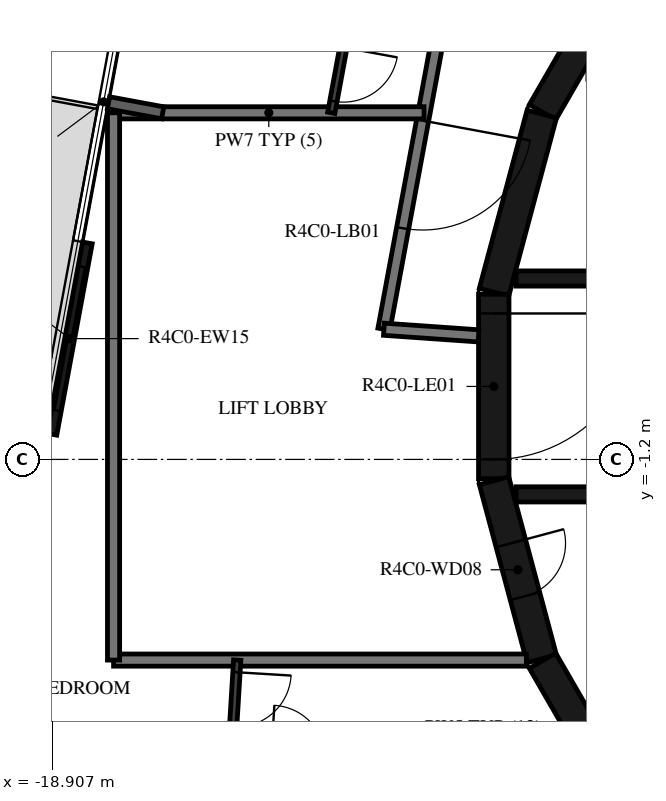
"""IFC4 building model, lengths in metres.
Left out: names, types, materials, properties, quantities, classifications, styles, units other than length and angle.
Written with IfcOpenShell. Run it as: python <this file> out.ifc"""

import sys

from ifc_helpers import new_model, si_unit, direction, frame, frame_2d, origin, place, context, subcontext, project, spatial, rectangle, extrude, element, fill, save


model = new_model("IFC4")
c1 = context("Model", 3, precision=1e-05, world=origin(), true_north=direction((0.0, 1.0)))
c2 = subcontext(c1, "Body", "Model", "MODEL_VIEW")
j1 = project(units=[si_unit("LENGTHUNIT", "METRE"), si_unit("PLANEANGLEUNIT", "RADIAN")], contexts=[c1])
p1 = place(None, origin())
s1 = spatial("IfcSite", under=j1, at=p1, CompositionType="ELEMENT")
p2 = place(p1, origin())
s2 = spatial("IfcBuilding", under=s1, at=p2, CompositionType="ELEMENT")
p3 = place(p2, frame((0.0, 0.0, 179.7)))
s3 = spatial("IfcBuildingStorey", under=s2, at=p3, CompositionType="ELEMENT", Elevation=179.7)
p4 = place(p3, frame((-18.33, 2.36, 0.0), z_axis=(0.0, 0.0, 1.0), x_axis=(-0.18226136951, -0.983250117307, 0.0)))
e1 = element("IfcWall", 1, at=p4, inside=s3, PredefinedType="STANDARD", context=c2, shape_type="SweptSolid", body=[
    extrude(rectangle(XDim=3.2, YDim=0.16, at=frame_2d((1.6, 0.0))), origin(), (0.0, 0.0, 1.0), 3.05),
])
p5 = place(p4, frame((0.4, 0.0, 0.0)))
e2 = element("IfcOpeningElement", 2, at=p5, cuts=e1, PredefinedType="OPENING", context=c2, shape_type="SweptSolid", body=[
    extrude(rectangle(XDim=2.4, YDim=2.4, at=frame_2d((1.2, 1.2))), frame((0.0, 0.09, 0.0), z_axis=(0.0, -1.0, 0.0), x_axis=(1.0, 0.0, 0.0)), (0.0, 0.0, 1.0), 0.18),
])
for number, where, z_axis, x_axis in (
    (3, (-9.329, 7.137, 0.0), (0.0, 0.0, 1.0), (-0.5, -0.866, 0.0)),
    (4, (-10.858, 4.479, 0.0), (0.0, 0.0, 1.0), (-0.259, -0.966, 0.0)),
):
    element("IfcWall", number, at=place(p3, frame(where, z_axis=z_axis, x_axis=x_axis)), inside=s3, PredefinedType="SHEAR", context=c2, shape_type="SweptSolid", body=[
        extrude(rectangle(XDim=3.033, YDim=0.5, at=frame_2d((1.516, 0.0))), origin(), (0.0, 0.0, 1.0), 3.05),
    ])
p6 = place(p3, frame((-11.647, 1.516, 0.0), z_axis=(0.0, 0.0, 1.0), x_axis=(0.0, -1.0, 0.0)))
e5 = element("IfcWall", 5, at=p6, inside=s3, PredefinedType="SHEAR", context=c2, shape_type="SweptSolid", body=[
    extrude(rectangle(XDim=3.033, YDim=0.5, at=frame_2d((1.516, 0.0))), origin(), (0.0, 0.0, 1.0), 3.05),
])
p7 = place(p6, frame((0.316, 0.0, 0.0)))
e6 = element("IfcOpeningElement", 6, at=p7, cuts=e5, PredefinedType="OPENING", context=c2, shape_type="SweptSolid", body=[
    extrude(rectangle(XDim=2.4, YDim=2.1, at=frame_2d((1.2, 1.05))), frame((0.0, 0.26, 0.0), z_axis=(0.0, -1.0, 0.0), x_axis=(1.0, 0.0, 0.0)), (0.0, 0.0, 1.0), 0.52),
])
p8 = place(p3, frame((-11.643, -1.55, 0.0), z_axis=(0.0, 0.0, 1.0), x_axis=(0.258734743916, -0.965948410781, 0.0)))
e7 = element("IfcWall", 7, at=p8, inside=s3, PredefinedType="SHEAR", context=c2, shape_type="SweptSolid", body=[
    extrude(rectangle(XDim=3.033, YDim=0.5, at=frame_2d((1.516, 0.0))), origin(), (0.0, 0.0, 1.0), 3.05),
])
p9 = place(p8, frame((1.066, 0.0, 0.0)))
e8 = element("IfcOpeningElement", 8, at=p9, cuts=e7, PredefinedType="OPENING", context=c2, shape_type="SweptSolid", body=[
    extrude(rectangle(XDim=0.9, YDim=2.1, at=frame_2d((0.45, 1.05))), frame((0.0, 0.26, 0.0), z_axis=(0.0, -1.0, 0.0), x_axis=(1.0, 0.0, 0.0)), (0.0, 0.0, 1.0), 0.52),
])
p10 = place(p3, frame((-10.845, -4.51, 0.0), z_axis=(0.0, 0.0, 1.0), x_axis=(0.500087131594, -0.865975092491, 0.0)))
e9 = element("IfcWall", 9, at=p10, inside=s3, PredefinedType="SHEAR", context=c2, shape_type="SweptSolid", body=[
    extrude(rectangle(XDim=3.033, YDim=0.5, at=frame_2d((1.516, 0.0))), origin(), (0.0, 0.0, 1.0), 3.05),
])
p11 = place(p3, frame((-11.28, 1.775, 0.0), z_axis=(0.0, 0.0, 1.0), x_axis=(1.0, 0.0, 0.0)))
e10 = element("IfcWall", 10, at=p11, inside=s3, PredefinedType="SHEAR", context=c2, shape_type="SweptSolid", body=[
    extrude(rectangle(XDim=14.38, YDim=0.25, at=frame_2d((7.19, 0.0))), origin(), (0.0, 0.0, 1.0), 3.05),
])
p12 = place(p11, frame((10.73, 0.0, 0.0)))
e11 = element("IfcOpeningElement", 11, at=p12, cuts=e10, PredefinedType="OPENING", context=c2, shape_type="SweptSolid", body=[
    extrude(rectangle(XDim=1.1, YDim=2.1, at=frame_2d((0.55, 1.05))), frame((0.0, 0.135, 0.0), z_axis=(0.0, -1.0, 0.0), x_axis=(1.0, 0.0, 0.0)), (0.0, 0.0, 1.0), 0.27),
])
p13 = place(p11, frame((12.88, 0.0, 0.0)))
e12 = element("IfcOpeningElement", 12, at=p13, cuts=e10, PredefinedType="OPENING", context=c2, shape_type="SweptSolid", body=[
    extrude(rectangle(XDim=1.1, YDim=2.1, at=frame_2d((0.55, 1.05))), frame((0.0, 0.135, 0.0), z_axis=(0.0, -1.0, 0.0), x_axis=(1.0, 0.0, 0.0)), (0.0, 0.0, 1.0), 0.27),
])
p14 = place(p11, frame((5.455, 0.0, 0.0)))
e13 = element("IfcOpeningElement", 13, at=p14, cuts=e10, PredefinedType="OPENING", context=c2, shape_type="SweptSolid", body=[
    extrude(rectangle(XDim=0.9, YDim=2.1, at=frame_2d((0.45, 1.05))), frame((0.0, 0.135, 0.0), z_axis=(0.0, -1.0, 0.0), x_axis=(1.0, 0.0, 0.0)), (0.0, 0.0, 1.0), 0.27),
])
p15 = place(p3, frame((-11.28, -1.775, 0.0), z_axis=(0.0, 0.0, 1.0), x_axis=(1.0, 0.0, 0.0)))
e14 = element("IfcWall", 14, at=p15, inside=s3, PredefinedType="SHEAR", context=c2, shape_type="SweptSolid", body=[
    extrude(rectangle(XDim=14.38, YDim=0.25, at=frame_2d((7.19, 0.0))), origin(), (0.0, 0.0, 1.0), 3.05),
])
p16 = place(p15, frame((12.88, 0.0, 0.0)))
e15 = element("IfcOpeningElement", 15, at=p16, cuts=e14, PredefinedType="OPENING", context=c2, shape_type="SweptSolid", body=[
    extrude(rectangle(XDim=1.1, YDim=2.1, at=frame_2d((0.55, 1.05))), frame((0.0, 0.135, 0.0), z_axis=(0.0, -1.0, 0.0), x_axis=(1.0, 0.0, 0.0)), (0.0, 0.0, 1.0), 0.27),
])
p17 = place(p15, frame((8.68, 0.0, 0.0)))
e16 = element("IfcOpeningElement", 16, at=p17, cuts=e14, PredefinedType="OPENING", context=c2, shape_type="SweptSolid", body=[
    extrude(rectangle(XDim=0.9, YDim=2.1, at=frame_2d((0.45, 1.05))), frame((0.0, 0.135, 0.0), z_axis=(0.0, -1.0, 0.0), x_axis=(1.0, 0.0, 0.0)), (0.0, 0.0, 1.0), 0.27),
])
p18 = place(p3, frame((-12.521, 5.972, 0.0), z_axis=(0.0, 0.0, 1.0), x_axis=(-0.182251559718, -0.983251935661, 0.0)))
e17 = element("IfcWall", 17, at=p18, inside=s3, PredefinedType="STANDARD", context=c2, shape_type="SweptSolid", body=[
    extrude(rectangle(XDim=5.117, YDim=0.2, at=frame_2d((2.559, 0.0))), origin(), (0.0, 0.0, 1.0), 3.05),
])
p19 = place(p18, frame((1.627, 0.0, 0.0)))
e18 = element("IfcOpeningElement", 18, at=p19, cuts=e17, PredefinedType="OPENING", context=c2, shape_type="SweptSolid", body=[
    extrude(rectangle(XDim=1.8, YDim=2.1, at=frame_2d((0.9, 1.05))), frame((0.0, 0.11, 0.0), z_axis=(0.0, -1.0, 0.0), x_axis=(1.0, 0.0, 0.0)), (0.0, 0.0, 1.0), 0.22),
])
p20 = place(p3, frame((-13.454, 0.941, 0.0), z_axis=(0.0, 0.0, 1.0), x_axis=(0.99755155062, -0.069934997354, 0.0)))
e19 = element("IfcWall", 19, at=p20, inside=s3, PredefinedType="STANDARD", context=c2, shape_type="SweptSolid", body=[
    extrude(rectangle(XDim=1.561, YDim=0.2, at=frame_2d((0.78, 0.0))), origin(), (0.0, 0.0, 1.0), 3.05),
])
p21 = place(p3, frame((-12.794, 4.5, 0.0), z_axis=(0.0, 0.0, 1.0), x_axis=(-1.0, 0.0, 0.0)))
e20 = element("IfcWall", 20, at=p21, inside=s3, PredefinedType="STANDARD", context=c2, shape_type="SweptSolid", body=[
    extrude(rectangle(XDim=5.106, YDim=0.2, at=frame_2d((2.553, 0.0))), origin(), (0.0, 0.0, 1.0), 3.05),
])
p22 = place(p3, frame((-17.9, -4.5, 0.0), z_axis=(0.0, 0.0, 1.0), x_axis=(1.0, 0.0, 0.0)))
e21 = element("IfcWall", 21, at=p22, inside=s3, PredefinedType="STANDARD", context=c2, shape_type="SweptSolid", body=[
    extrude(rectangle(XDim=6.789, YDim=0.2, at=frame_2d((3.394, 0.0))), origin(), (0.0, 0.0, 1.0), 3.05),
])
p23 = place(p3, frame((-17.9, 4.5, 0.0), z_axis=(0.0, 0.0, 1.0), x_axis=(0.0, -1.0, 0.0)))
e22 = element("IfcWall", 22, at=p23, inside=s3, PredefinedType="STANDARD", context=c2, shape_type="SweptSolid", body=[
    extrude(rectangle(XDim=9.0, YDim=0.2, at=frame_2d((4.5, 0.0))), origin(), (0.0, 0.0, 1.0), 3.05),
])
p24 = place(p3, frame((-17.984, 4.665, 0.0), z_axis=(0.0, 0.0, 1.0), x_axis=(0.98328378843, -0.182079629313, 0.0)))
e23 = element("IfcWall", 23, at=p24, inside=s3, PredefinedType="STANDARD", context=c2, shape_type="SweptSolid", body=[
    extrude(rectangle(XDim=0.908, YDim=0.2, at=frame_2d((0.454, 0.0))), origin(), (0.0, 0.0, 1.0), 3.05),
])
p25 = place(p3, frame((-13.923, 6.641, 0.0), z_axis=(0.0, 0.0, 1.0), x_axis=(-0.182209715759, -0.983259690765, 0.0)))
e24 = element("IfcWall", 24, at=p25, inside=s3, PredefinedType="PARTITIONING", context=c2, shape_type="SweptSolid", body=[
    extrude(rectangle(XDim=2.177, YDim=0.12, at=frame_2d((1.089, 0.0))), origin(), (0.0, 0.0, 1.0), 3.05),
])
p26 = place(p25, frame((1.083, 0.0, 0.0)))
e25 = element("IfcOpeningElement", 25, at=p26, cuts=e24, PredefinedType="OPENING", context=c2, shape_type="SweptSolid", body=[
    extrude(rectangle(XDim=0.9, YDim=2.1, at=frame_2d((0.45, 1.05))), frame((0.0, 0.07, 0.0), z_axis=(0.0, -1.0, 0.0), x_axis=(1.0, 0.0, 0.0)), (0.0, 0.0, 1.0), 0.14),
])
p27 = place(p3, frame((-15.866, -4.5, 0.0), z_axis=(0.0, 0.0, 1.0), x_axis=(-0.060986374837, -0.998138598635, 0.0)))
e26 = element("IfcWall", 26, at=p27, inside=s3, PredefinedType="PARTITIONING", context=c2, shape_type="SweptSolid", body=[
    extrude(rectangle(XDim=1.605, YDim=0.12, at=frame_2d((0.803, 0.0))), origin(), (0.0, 0.0, 1.0), 3.05),
])
p28 = place(p27, frame((0.2, 0.0, 0.0)))
e27 = element("IfcOpeningElement", 27, at=p28, cuts=e26, PredefinedType="OPENING", context=c2, shape_type="SweptSolid", body=[
    extrude(rectangle(XDim=0.9, YDim=2.1, at=frame_2d((0.45, 1.05))), frame((0.0, 0.07, 0.0), z_axis=(0.0, -1.0, 0.0), x_axis=(1.0, 0.0, 0.0)), (0.0, 0.0, 1.0), 0.14),
])
p29 = place(p5, origin())
e28 = element("IfcDoor", 28, at=p29, inside=s3, OperationType="DOUBLE_DOOR_SLIDING", PredefinedType="DOOR", context=c2, shape_type="SweptSolid", body=[
    extrude(rectangle(XDim=2.4, YDim=2.4, at=frame_2d((1.2, 1.2))), frame((0.0, 0.025, 0.0), z_axis=(0.0, -1.0, 0.0), x_axis=(1.0, 0.0, 0.0)), (0.0, 0.0, 1.0), 0.05),
])
fill(e2, e28)
p30 = place(p7, origin())
e29 = element("IfcDoor", 29, at=p30, inside=s3, OperationType="DOUBLE_DOOR_SINGLE_SWING", PredefinedType="DOOR", context=c2, shape_type="SweptSolid", body=[
    extrude(rectangle(XDim=2.4, YDim=2.1, at=frame_2d((1.2, 1.05))), frame((0.0, 0.025, 0.0), z_axis=(0.0, -1.0, 0.0), x_axis=(1.0, 0.0, 0.0)), (0.0, 0.0, 1.0), 0.05),
])
fill(e6, e29)
p31 = place(p9, origin())
e30 = element("IfcDoor", 30, at=p31, inside=s3, OperationType="SINGLE_SWING_RIGHT", PredefinedType="DOOR", context=c2, shape_type="SweptSolid", body=[
    extrude(rectangle(XDim=0.9, YDim=2.1, at=frame_2d((0.45, 1.05))), frame((0.0, 0.025, 0.0), z_axis=(0.0, -1.0, 0.0), x_axis=(1.0, 0.0, 0.0)), (0.0, 0.0, 1.0), 0.05),
])
fill(e8, e30)
p32 = place(p26, origin())
e31 = element("IfcDoor", 31, at=p32, inside=s3, OperationType="SINGLE_SWING_LEFT", PredefinedType="DOOR", context=c2, shape_type="SweptSolid", body=[
    extrude(rectangle(XDim=0.9, YDim=2.1, at=frame_2d((0.45, 1.05))), frame((0.0, 0.025, 0.0), z_axis=(0.0, -1.0, 0.0), x_axis=(1.0, 0.0, 0.0)), (0.0, 0.0, 1.0), 0.05),
])
fill(e25, e31)
p33 = place(p28, origin())
e32 = element("IfcDoor", 32, at=p33, inside=s3, OperationType="SINGLE_SWING_RIGHT", PredefinedType="DOOR", context=c2, shape_type="SweptSolid", body=[
    extrude(rectangle(XDim=0.9, YDim=2.1, at=frame_2d((0.45, 1.05))), frame((0.0, 0.025, 0.0), z_axis=(0.0, -1.0, 0.0), x_axis=(1.0, 0.0, 0.0)), (0.0, 0.0, 1.0), 0.05),
])
fill(e27, e32)
p34 = place(p19, origin())
e33 = element("IfcDoor", 33, at=p34, inside=s3, OperationType="DOUBLE_DOOR_SINGLE_SWING", PredefinedType="DOOR", context=c2, shape_type="SweptSolid", body=[
    extrude(rectangle(XDim=1.8, YDim=2.1, at=frame_2d((0.9, 1.05))), frame((0.0, 0.025, 0.0), z_axis=(0.0, -1.0, 0.0), x_axis=(1.0, 0.0, 0.0)), (0.0, 0.0, 1.0), 0.05),
])
fill(e18, e33)
save(model, sys.argv[1])
